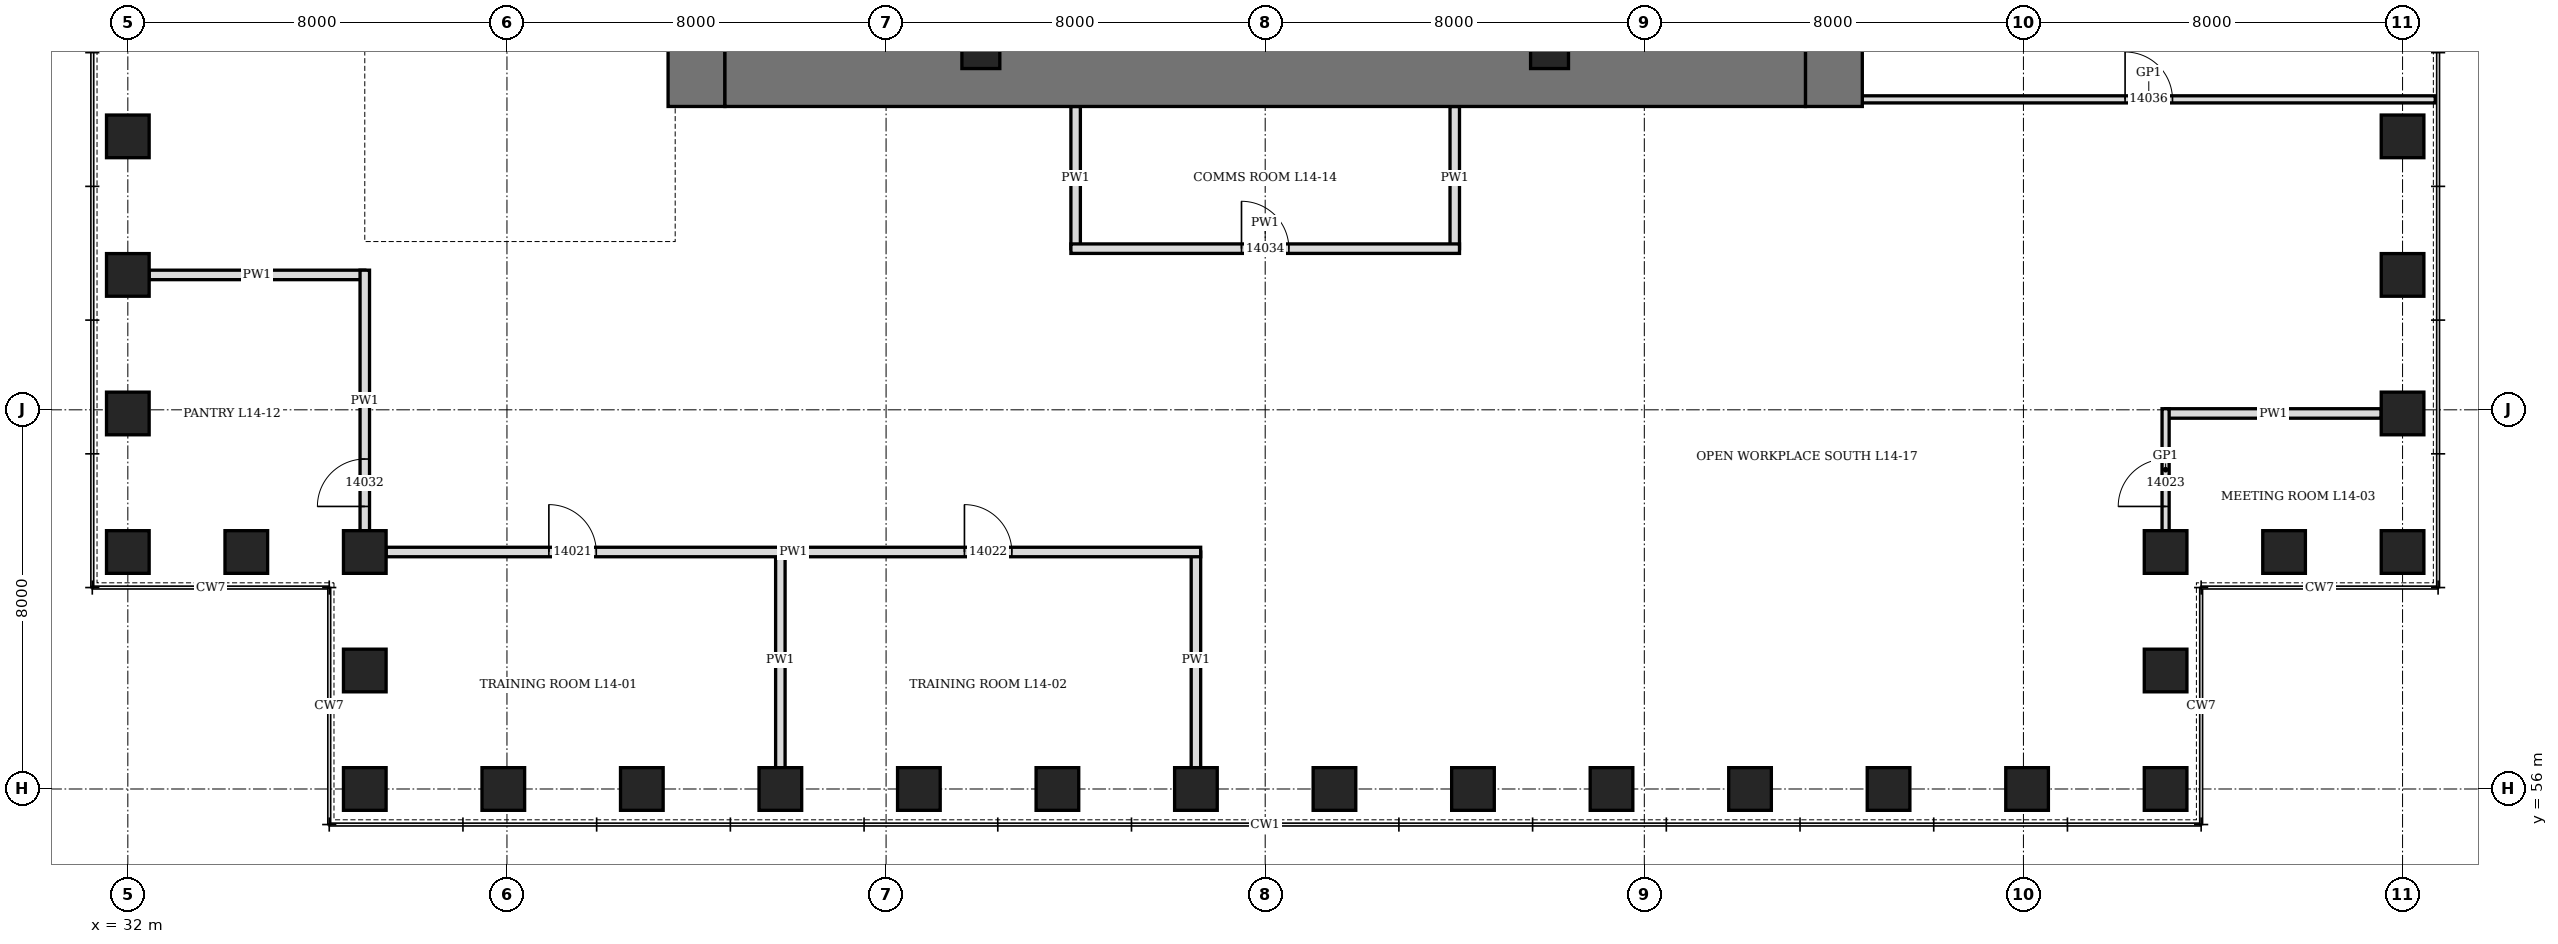
"""IFC4 building model, lengths in metres.
Left out: names, types, materials, properties, quantities, classifications, styles, units other than length and angle.
Written with IfcOpenShell. Run it as: python <this file> out.ifc"""

import sys

from ifc_helpers import new_model, si_unit, direction, frame, frame_2d, origin, origin_2d, place, context, subcontext, project, spatial, rectangle, hollow_rectangle, extrude, element, fill, save


model = new_model("IFC4")
c1 = context("Model", 3, precision=1e-05, world=origin(), true_north=direction((0.0, 1.0)))
c2 = subcontext(c1, "Body", "Model", "MODEL_VIEW")
j1 = project(units=[si_unit("LENGTHUNIT", "METRE"), si_unit("PLANEANGLEUNIT", "RADIAN")], contexts=[c1])
p1 = place(None, origin())
s1 = spatial("IfcSite", under=j1, at=p1, CompositionType="ELEMENT")
p2 = place(p1, origin())
s2 = spatial("IfcBuilding", under=s1, at=p2, CompositionType="ELEMENT")
p3 = place(p2, frame((0.0, 0.0, 68.5)))
s3 = spatial("IfcBuildingStorey", under=s2, at=p3, CompositionType="ELEMENT", Elevation=68.5)
for number, where, z_axis, x_axis in (
    (1, (37.0, 56.0, 0.0), (0.0, 0.0, 1.0), (1.0, 0.0, 0.0)),
    (2, (39.923, 56.0, 0.0), (0.0, 0.0, 1.0), (1.0, 0.0, 0.0)),
    (3, (42.846, 56.0, 0.0), (0.0, 0.0, 1.0), (1.0, 0.0, 0.0)),
    (4, (45.769, 56.0, 0.0), (0.0, 0.0, 1.0), (1.0, 0.0, 0.0)),
    (5, (48.692, 56.0, 0.0), (0.0, 0.0, 1.0), (1.0, 0.0, 0.0)),
    (6, (51.615, 56.0, 0.0), (0.0, 0.0, 1.0), (1.0, 0.0, 0.0)),
    (7, (54.539, 56.0, 0.0), (0.0, 0.0, 1.0), (1.0, 0.0, 0.0)),
    (8, (57.461, 56.0, 0.0), (0.0, 0.0, 1.0), (1.0, 0.0, 0.0)),
    (9, (60.385, 56.0, 0.0), (0.0, 0.0, 1.0), (1.0, 0.0, 0.0)),
    (10, (63.308, 56.0, 0.0), (0.0, 0.0, 1.0), (1.0, 0.0, 0.0)),
    (11, (66.231, 56.0, 0.0), (0.0, 0.0, 1.0), (1.0, 0.0, 0.0)),
    (12, (69.154, 56.0, 0.0), (0.0, 0.0, 1.0), (1.0, 0.0, 0.0)),
    (13, (72.077, 56.0, 0.0), (0.0, 0.0, 1.0), (1.0, 0.0, 0.0)),
    (14, (75.0, 56.0, 0.0), (0.0, 0.0, 1.0), (0.0, 1.0, 0.0)),
    (15, (75.0, 58.5, 0.0), (0.0, 0.0, 1.0), (0.0, 1.0, 0.0)),
    (16, (75.0, 61.0, 0.0), (0.0, 0.0, 1.0), (1.0, 0.0, 0.0)),
    (17, (77.5, 61.0, 0.0), (0.0, 0.0, 1.0), (1.0, 0.0, 0.0)),
    (18, (80.0, 61.0, 0.0), (0.0, 0.0, 1.0), (0.0, 1.0, 0.0)),
    (19, (80.0, 63.923, 0.0), (0.0, 0.0, 1.0), (0.0, 1.0, 0.0)),
    (20, (80.0, 66.846, 0.0), (0.0, 0.0, 1.0), (0.0, 1.0, 0.0)),
    (21, (80.0, 69.769, 0.0), (0.0, 0.0, 1.0), (0.0, 1.0, 0.0)),
    (22, (32.0, 69.769, 0.0), (0.0, 0.0, 1.0), (0.0, 1.0, 0.0)),
    (23, (32.0, 66.846, 0.0), (0.0, 0.0, 1.0), (0.0, 1.0, 0.0)),
    (24, (32.0, 63.923, 0.0), (0.0, 0.0, 1.0), (0.0, 1.0, 0.0)),
    (25, (32.0, 61.0, 0.0), (0.0, 0.0, 1.0), (1.0, 0.0, 0.0)),
    (26, (34.5, 61.0, 0.0), (0.0, 0.0, 1.0), (1.0, 0.0, 0.0)),
    (27, (37.0, 61.0, 0.0), (0.0, 0.0, 1.0), (0.0, 1.0, 0.0)),
    (28, (37.0, 58.5, 0.0), (0.0, 0.0, 1.0), (0.0, 1.0, 0.0)),
):
    element("IfcColumn", number, at=place(p3, frame(where, z_axis=z_axis, x_axis=x_axis)), inside=s3, PredefinedType="COLUMN", context=c2, shape_type="SweptSolid", body=[
        extrude(hollow_rectangle(XDim=0.9, YDim=0.9, WallThickness=0.12, at=origin_2d()), origin(), (0.0, 0.0, 1.0), 4.2),
    ])
p4 = place(p3, frame((44.0, 70.4, 0.0), z_axis=(0.0, 0.0, 1.0), x_axis=(0.0, 1.0, 0.0)))
e29 = element("IfcWall", 29, at=p4, inside=s3, PredefinedType="SHEAR", context=c2, shape_type="SweptSolid", body=[
    extrude(rectangle(XDim=19.2, YDim=1.2, at=frame_2d((9.6, 0.0))), origin(), (0.0, 0.0, 1.0), 4.2),
])
p5 = place(p4, frame((8.6, 0.0, 0.0)))
e30 = element("IfcOpeningElement", 30, at=p5, cuts=e29, PredefinedType="OPENING", context=c2, shape_type="SweptSolid", body=[
    extrude(rectangle(XDim=2.0, YDim=2.4, at=frame_2d((1.0, 1.2))), frame((0.0, 0.61, 0.0), z_axis=(0.0, -1.0, 0.0), x_axis=(1.0, 0.0, 0.0)), (0.0, 0.0, 1.0), 1.22),
])
p6 = place(p3, frame((68.0, 70.4, 0.0), z_axis=(0.0, 0.0, 1.0), x_axis=(0.0, 1.0, 0.0)))
e31 = element("IfcWall", 31, at=p6, inside=s3, PredefinedType="SHEAR", context=c2, shape_type="SweptSolid", body=[
    extrude(rectangle(XDim=19.2, YDim=1.2, at=frame_2d((9.6, 0.0))), origin(), (0.0, 0.0, 1.0), 4.2),
])
p7 = place(p6, frame((8.6, 0.0, 0.0)))
e32 = element("IfcOpeningElement", 32, at=p7, cuts=e31, PredefinedType="OPENING", context=c2, shape_type="SweptSolid", body=[
    extrude(rectangle(XDim=2.0, YDim=2.4, at=frame_2d((1.0, 1.2))), frame((0.0, 0.61, 0.0), z_axis=(0.0, -1.0, 0.0), x_axis=(1.0, 0.0, 0.0)), (0.0, 0.0, 1.0), 1.22),
])
p8 = place(p3, frame((44.6, 71.0, 0.0), z_axis=(0.0, 0.0, 1.0), x_axis=(1.0, 0.0, 0.0)))
e33 = element("IfcWall", 33, at=p8, inside=s3, PredefinedType="SHEAR", context=c2, shape_type="SweptSolid", body=[
    extrude(rectangle(XDim=22.8, YDim=1.2, at=frame_2d((11.4, 0.0))), origin(), (0.0, 0.0, 1.0), 4.2),
])
for number, where, z_axis, x_axis in (
    (34, (50.0, 71.6, 0.0), (0.0, 0.0, 1.0), (1.0, 0.0, 0.0)),
    (35, (62.0, 71.6, 0.0), (0.0, 0.0, 1.0), (1.0, 0.0, 0.0)),
):
    element("IfcColumn", number, at=place(p3, frame(where, z_axis=z_axis, x_axis=x_axis)), inside=s3, PredefinedType="COLUMN", context=c2, shape_type="SweptSolid", body=[
        extrude(hollow_rectangle(XDim=0.8, YDim=0.8, WallThickness=0.1, at=origin_2d()), origin(), (0.0, 0.0, 1.0), 4.2),
    ])
for number, where, z_axis, x_axis in (
    (36, (45.769, 56.45, 0.0), (0.0, 0.0, 1.0), (0.0, 1.0, 0.0)),
    (37, (54.539, 56.45, 0.0), (0.0, 0.0, 1.0), (0.0, 1.0, 0.0)),
):
    element("IfcWall", number, at=place(p3, frame(where, z_axis=z_axis, x_axis=x_axis)), inside=s3, PredefinedType="PARTITIONING", context=c2, shape_type="SweptSolid", body=[
        extrude(rectangle(XDim=4.55, YDim=0.2, at=frame_2d((2.275, 0.0))), origin(), (0.0, 0.0, 1.0), 3.278),
    ])
for number, where, z_axis, x_axis in (
    (38, (75.0, 63.923, 0.0), (0.0, 0.0, 1.0), (1.0, 0.0, 0.0)),
    (39, (32.45, 66.846, 0.0), (0.0, 0.0, 1.0), (1.0, 0.0, 0.0)),
):
    element("IfcWall", number, at=place(p3, frame(where, z_axis=z_axis, x_axis=x_axis)), inside=s3, PredefinedType="PARTITIONING", context=c2, shape_type="SweptSolid", body=[
        extrude(rectangle(XDim=4.55, YDim=0.2, at=frame_2d((2.275, 0.0))), origin(), (0.0, 0.0, 1.0), 3.428),
    ])
for number, where, z_axis, x_axis in (
    (40, (52.0, 67.4, 0.0), (0.0, 0.0, 1.0), (0.0, 1.0, 0.0)),
    (41, (60.0, 67.4, 0.0), (0.0, 0.0, 1.0), (0.0, 1.0, 0.0)),
):
    element("IfcWall", number, at=place(p3, frame(where, z_axis=z_axis, x_axis=x_axis)), inside=s3, PredefinedType="PARTITIONING", context=c2, shape_type="SweptSolid", body=[
        extrude(rectangle(XDim=3.0, YDim=0.2, at=frame_2d((1.5, 0.0))), origin(), (0.0, 0.0, 1.0), 4.04),
    ])
p9 = place(p3, frame((37.45, 61.0, 0.0), z_axis=(0.0, 0.0, 1.0), x_axis=(1.0, 0.0, 0.0)))
e42 = element("IfcWall", 42, at=p9, inside=s3, PredefinedType="PARTITIONING", context=c2, shape_type="SweptSolid", body=[
    extrude(rectangle(XDim=17.188, YDim=0.2, at=frame_2d((8.594, 0.0))), origin(), (0.0, 0.0, 1.0), 4.04),
])
p10 = place(p9, frame((3.435, 0.0, 0.0)))
e43 = element("IfcOpeningElement", 43, at=p10, cuts=e42, PredefinedType="OPENING", context=c2, shape_type="SweptSolid", body=[
    extrude(rectangle(XDim=1.0, YDim=2.1, at=frame_2d((0.5, 1.05))), frame((0.0, 0.11, 0.0), z_axis=(0.0, -1.0, 0.0), x_axis=(1.0, 0.0, 0.0)), (0.0, 0.0, 1.0), 0.22),
])
p11 = place(p9, frame((12.204, 0.0, 0.0)))
e44 = element("IfcOpeningElement", 44, at=p11, cuts=e42, PredefinedType="OPENING", context=c2, shape_type="SweptSolid", body=[
    extrude(rectangle(XDim=1.0, YDim=2.1, at=frame_2d((0.5, 1.05))), frame((0.0, 0.11, 0.0), z_axis=(0.0, -1.0, 0.0), x_axis=(1.0, 0.0, 0.0)), (0.0, 0.0, 1.0), 0.22),
])
p12 = place(p3, frame((51.9, 67.4, 0.0), z_axis=(0.0, 0.0, 1.0), x_axis=(1.0, 0.0, 0.0)))
e45 = element("IfcWall", 45, at=p12, inside=s3, PredefinedType="PARTITIONING", context=c2, shape_type="SweptSolid", body=[
    extrude(rectangle(XDim=8.2, YDim=0.2, at=frame_2d((4.1, 0.0))), origin(), (0.0, 0.0, 1.0), 4.04),
])
p13 = place(p12, frame((3.6, 0.0, 0.0)))
e46 = element("IfcOpeningElement", 46, at=p13, cuts=e45, PredefinedType="OPENING", context=c2, shape_type="SweptSolid", body=[
    extrude(rectangle(XDim=1.0, YDim=2.1, at=frame_2d((0.5, 1.05))), frame((0.0, 0.11, 0.0), z_axis=(0.0, -1.0, 0.0), x_axis=(1.0, 0.0, 0.0)), (0.0, 0.0, 1.0), 0.22),
])
p14 = place(p3, frame((68.6, 70.55, 0.0), z_axis=(0.0, 0.0, 1.0), x_axis=(1.0, 0.0, 0.0)))
e47 = element("IfcWall", 47, at=p14, inside=s3, PredefinedType="PARTITIONING", context=c2, shape_type="SweptSolid", body=[
    extrude(rectangle(XDim=12.09, YDim=0.15, at=frame_2d((6.045, 0.0))), origin(), (0.0, 0.0, 1.0), 4.04),
])
p15 = place(p14, frame((5.545, 0.0, 0.0)))
e48 = element("IfcOpeningElement", 48, at=p15, cuts=e47, PredefinedType="OPENING", context=c2, shape_type="SweptSolid", body=[
    extrude(rectangle(XDim=1.0, YDim=2.4, at=frame_2d((0.5, 1.2))), frame((0.0, 0.085, 0.0), z_axis=(0.0, -1.0, 0.0), x_axis=(1.0, 0.0, 0.0)), (0.0, 0.0, 1.0), 0.17),
])
p16 = place(p3, frame((37.0, 61.45, 0.0), z_axis=(0.0, 0.0, 1.0), x_axis=(0.0, 1.0, 0.0)))
e49 = element("IfcWall", 49, at=p16, inside=s3, PredefinedType="PARTITIONING", context=c2, shape_type="SweptSolid", body=[
    extrude(rectangle(XDim=5.496, YDim=0.2, at=frame_2d((2.748, 0.0))), origin(), (0.0, 0.0, 1.0), 4.04),
])
p17 = place(p16, frame((0.511, 0.0, 0.0)))
e50 = element("IfcOpeningElement", 50, at=p17, cuts=e49, PredefinedType="OPENING", context=c2, shape_type="SweptSolid", body=[
    extrude(rectangle(XDim=1.0, YDim=2.1, at=frame_2d((0.5, 1.05))), frame((0.0, 0.11, 0.0), z_axis=(0.0, -1.0, 0.0), x_axis=(1.0, 0.0, 0.0)), (0.0, 0.0, 1.0), 0.22),
])
p18 = place(p3, frame((75.0, 61.45, 0.0), z_axis=(0.0, 0.0, 1.0), x_axis=(0.0, 1.0, 0.0)))
e51 = element("IfcWall", 51, at=p18, inside=s3, PredefinedType="PARTITIONING", context=c2, shape_type="SweptSolid", body=[
    extrude(rectangle(XDim=2.573, YDim=0.15, at=frame_2d((1.287, 0.0))), origin(), (0.0, 0.0, 1.0), 4.04),
])
p19 = place(p18, frame((0.511, 0.0, 0.0)))
e52 = element("IfcOpeningElement", 52, at=p19, cuts=e51, PredefinedType="OPENING", context=c2, shape_type="SweptSolid", body=[
    extrude(rectangle(XDim=1.0, YDim=2.4, at=frame_2d((0.5, 1.2))), frame((0.0, 0.085, 0.0), z_axis=(0.0, -1.0, 0.0), x_axis=(1.0, 0.0, 0.0)), (0.0, 0.0, 1.0), 0.17),
])
p20 = place(p10, origin())
e53 = element("IfcDoor", 53, at=p20, inside=s3, OperationType="SINGLE_SWING_LEFT", PredefinedType="DOOR", context=c2, shape_type="SweptSolid", body=[
    extrude(rectangle(XDim=1.0, YDim=2.1, at=frame_2d((0.5, 1.05))), frame((0.0, 0.1, 0.0), z_axis=(0.0, -1.0, 0.0), x_axis=(1.0, 0.0, 0.0)), (0.0, 0.0, 1.0), 0.199),
])
fill(e43, e53)
p21 = place(p11, origin())
e54 = element("IfcDoor", 54, at=p21, inside=s3, OperationType="SINGLE_SWING_LEFT", PredefinedType="DOOR", context=c2, shape_type="SweptSolid", body=[
    extrude(rectangle(XDim=1.0, YDim=2.1, at=frame_2d((0.5, 1.05))), frame((0.0, 0.1, 0.0), z_axis=(0.0, -1.0, 0.0), x_axis=(1.0, 0.0, 0.0)), (0.0, 0.0, 1.0), 0.199),
])
fill(e44, e54)
p22 = place(p19, origin())
e55 = element("IfcDoor", 55, at=p22, inside=s3, OperationType="SINGLE_SWING_RIGHT", PredefinedType="DOOR", context=c2, shape_type="SweptSolid", body=[
    extrude(rectangle(XDim=1.0, YDim=2.4, at=frame_2d((0.5, 1.2))), frame((0.0, 0.075, 0.0), z_axis=(0.0, -1.0, 0.0), x_axis=(1.0, 0.0, 0.0)), (0.0, 0.0, 1.0), 0.149),
])
fill(e52, e55)
p23 = place(p17, origin())
e56 = element("IfcDoor", 56, at=p23, inside=s3, OperationType="SINGLE_SWING_LEFT", PredefinedType="DOOR", context=c2, shape_type="SweptSolid", body=[
    extrude(rectangle(XDim=1.0, YDim=2.1, at=frame_2d((0.5, 1.05))), frame((0.0, 0.1, 0.0), z_axis=(0.0, -1.0, 0.0), x_axis=(1.0, 0.0, 0.0)), (0.0, 0.0, 1.0), 0.199),
])
fill(e50, e56)
p24 = place(p13, origin())
e57 = element("IfcDoor", 57, at=p24, inside=s3, OperationType="SINGLE_SWING_LEFT", PredefinedType="DOOR", context=c2, shape_type="SweptSolid", body=[
    extrude(rectangle(XDim=1.0, YDim=2.1, at=frame_2d((0.5, 1.05))), frame((0.0, 0.1, 0.0), z_axis=(0.0, -1.0, 0.0), x_axis=(1.0, 0.0, 0.0)), (0.0, 0.0, 1.0), 0.199),
])
fill(e46, e57)
p25 = place(p15, origin())
e58 = element("IfcDoor", 58, at=p25, inside=s3, OperationType="SINGLE_SWING_RIGHT", PredefinedType="DOOR", context=c2, shape_type="SweptSolid", body=[
    extrude(rectangle(XDim=1.0, YDim=2.4, at=frame_2d((0.5, 1.2))), frame((0.0, 0.075, 0.0), z_axis=(0.0, -1.0, 0.0), x_axis=(1.0, 0.0, 0.0)), (0.0, 0.0, 1.0), 0.149),
])
fill(e48, e58)
save(model, sys.argv[1])
